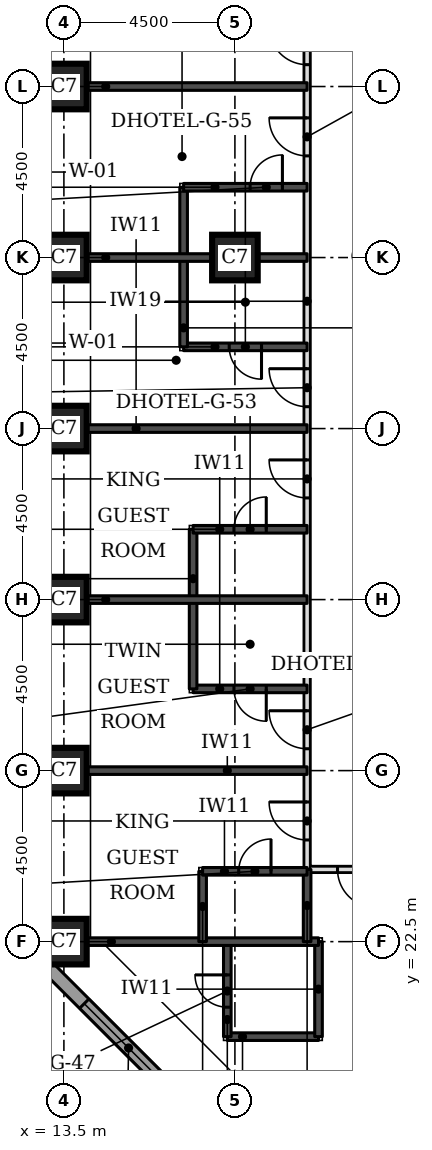
"""IFC4 building model, lengths in metres.
Left out: names, types, materials, properties, quantities, classifications, styles, units other than length and angle.
Written with IfcOpenShell. Run it as: python <this file> out.ifc"""

import sys

from ifc_helpers import new_model, si_unit, direction, frame, frame_2d, origin, origin_2d, place, context, subcontext, project, spatial, rectangle, extrude, element, fill, save


model = new_model("IFC4")
c1 = context("Model", 3, precision=1e-05, world=origin(), true_north=direction((0.0, 1.0)))
c2 = subcontext(c1, "Body", "Model", "MODEL_VIEW")
j1 = project(units=[si_unit("LENGTHUNIT", "METRE"), si_unit("PLANEANGLEUNIT", "RADIAN")], contexts=[c1])
p1 = place(None, origin())
s1 = spatial("IfcSite", under=j1, at=p1, CompositionType="ELEMENT")
p2 = place(p1, origin())
s2 = spatial("IfcBuilding", under=s1, at=p2, CompositionType="ELEMENT")
p3 = place(p2, frame((0.0, 0.0, 66.0)))
s3 = spatial("IfcBuildingStorey", under=s2, at=p3, CompositionType="ELEMENT", Elevation=66.0)
for number, where, z_axis, x_axis in (
    (1, (13.5, 22.5, 0.0), (0.0, 0.0, 1.0), (1.0, 0.0, 0.0)),
    (2, (13.5, 27.0, 0.0), (0.0, 0.0, 1.0), (1.0, 0.0, 0.0)),
    (3, (13.5, 31.5, 0.0), (0.0, 0.0, 1.0), (1.0, 0.0, 0.0)),
    (4, (13.5, 36.0, 0.0), (0.0, 0.0, 1.0), (1.0, 0.0, 0.0)),
    (5, (13.5, 40.5, 0.0), (0.0, 0.0, 1.0), (1.0, 0.0, 0.0)),
    (6, (18.0, 40.5, 0.0), (0.0, 0.0, 1.0), (1.0, 0.0, 0.0)),
    (7, (13.5, 45.0, 0.0), (0.0, 0.0, 1.0), (1.0, 0.0, 0.0)),
):
    element("IfcColumn", number, at=place(p3, frame(where, z_axis=z_axis, x_axis=x_axis)), inside=s3, PredefinedType="COLUMN", context=c2, shape_type="SweptSolid", body=[
        extrude(rectangle(XDim=1.2, YDim=1.2, at=origin_2d()), origin(), (0.0, 0.0, 1.0), 3.3),
    ])
p4 = place(p3, frame((12.674, 22.23, 0.0), z_axis=(0.0, 0.0, 1.0), x_axis=(0.707106781187, -0.707106781187, 0.0)))
e8 = element("IfcWall", 8, at=p4, inside=s3, PredefinedType="STANDARD", context=c2, shape_type="SweptSolid", body=[
    extrude(rectangle(XDim=7.151, YDim=0.35, at=frame_2d((3.576, 0.0))), origin(), (0.0, 0.0, 1.0), 3.055),
])
p5 = place(p4, frame((1.926, 0.0, 0.8)))
e9 = element("IfcOpeningElement", 9, at=p5, cuts=e8, PredefinedType="OPENING", context=c2, shape_type="SweptSolid", body=[
    extrude(rectangle(XDim=3.3, YDim=1.5, at=frame_2d((1.65, 0.75))), frame((0.0, 0.185, 0.0), z_axis=(0.0, -1.0, 0.0), x_axis=(1.0, 0.0, 0.0)), (0.0, 0.0, 1.0), 0.37),
])
p6 = place(p3, frame((19.9, 24.4, 0.0), z_axis=(0.0, 0.0, 1.0), x_axis=(1.0, 0.0, 0.0)))
e10 = element("IfcWall", 10, at=p6, inside=s3, PredefinedType="PARTITIONING", context=c2, shape_type="SweptSolid", body=[
    extrude(rectangle(XDim=32.2, YDim=0.15, at=frame_2d((16.1, 0.0))), origin(), (0.0, 0.0, 1.0), 3.08),
])
p7 = place(p6, frame((4.4, 0.0, 0.0)))
e11 = element("IfcOpeningElement", 11, at=p7, cuts=e10, PredefinedType="OPENING", context=c2, shape_type="SweptSolid", body=[
    extrude(rectangle(XDim=0.9, YDim=2.1, at=frame_2d((0.45, 1.05))), frame((0.0, 0.085, 0.0), z_axis=(0.0, -1.0, 0.0), x_axis=(1.0, 0.0, 0.0)), (0.0, 0.0, 1.0), 0.17),
])
p8 = place(p6, frame((8.9, 0.0, 0.0)))
e12 = element("IfcOpeningElement", 12, at=p8, cuts=e10, PredefinedType="OPENING", context=c2, shape_type="SweptSolid", body=[
    extrude(rectangle(XDim=0.9, YDim=2.1, at=frame_2d((0.45, 1.05))), frame((0.0, 0.085, 0.0), z_axis=(0.0, -1.0, 0.0), x_axis=(1.0, 0.0, 0.0)), (0.0, 0.0, 1.0), 0.17),
])
p9 = place(p6, frame((13.4, 0.0, 0.0)))
e13 = element("IfcOpeningElement", 13, at=p9, cuts=e10, PredefinedType="OPENING", context=c2, shape_type="SweptSolid", body=[
    extrude(rectangle(XDim=0.9, YDim=2.1, at=frame_2d((0.45, 1.05))), frame((0.0, 0.085, 0.0), z_axis=(0.0, -1.0, 0.0), x_axis=(1.0, 0.0, 0.0)), (0.0, 0.0, 1.0), 0.17),
])
p10 = place(p6, frame((17.9, 0.0, 0.0)))
e14 = element("IfcOpeningElement", 14, at=p10, cuts=e10, PredefinedType="OPENING", context=c2, shape_type="SweptSolid", body=[
    extrude(rectangle(XDim=0.9, YDim=2.1, at=frame_2d((0.45, 1.05))), frame((0.0, 0.085, 0.0), z_axis=(0.0, -1.0, 0.0), x_axis=(1.0, 0.0, 0.0)), (0.0, 0.0, 1.0), 0.17),
])
p11 = place(p6, frame((22.4, 0.0, 0.0)))
e15 = element("IfcOpeningElement", 15, at=p11, cuts=e10, PredefinedType="OPENING", context=c2, shape_type="SweptSolid", body=[
    extrude(rectangle(XDim=0.9, YDim=2.1, at=frame_2d((0.45, 1.05))), frame((0.0, 0.085, 0.0), z_axis=(0.0, -1.0, 0.0), x_axis=(1.0, 0.0, 0.0)), (0.0, 0.0, 1.0), 0.17),
])
p12 = place(p6, frame((26.9, 0.0, 0.0)))
e16 = element("IfcOpeningElement", 16, at=p12, cuts=e10, PredefinedType="OPENING", context=c2, shape_type="SweptSolid", body=[
    extrude(rectangle(XDim=0.9, YDim=2.1, at=frame_2d((0.45, 1.05))), frame((0.0, 0.085, 0.0), z_axis=(0.0, -1.0, 0.0), x_axis=(1.0, 0.0, 0.0)), (0.0, 0.0, 1.0), 0.17),
])
p13 = place(p6, frame((0.8, 0.0, 0.0)))
e17 = element("IfcOpeningElement", 17, at=p13, cuts=e10, PredefinedType="OPENING", context=c2, shape_type="SweptSolid", body=[
    extrude(rectangle(XDim=1.0, YDim=2.1, at=frame_2d((0.5, 1.05))), frame((0.0, 0.085, 0.0), z_axis=(0.0, -1.0, 0.0), x_axis=(1.0, 0.0, 0.0)), (0.0, 0.0, 1.0), 0.17),
])
p14 = place(p6, frame((30.4, 0.0, 0.0)))
e18 = element("IfcOpeningElement", 18, at=p14, cuts=e10, PredefinedType="OPENING", context=c2, shape_type="SweptSolid", body=[
    extrude(rectangle(XDim=1.0, YDim=2.1, at=frame_2d((0.5, 1.05))), frame((0.0, 0.085, 0.0), z_axis=(0.0, -1.0, 0.0), x_axis=(1.0, 0.0, 0.0)), (0.0, 0.0, 1.0), 0.17),
])
p15 = place(p3, frame((19.9, 24.4, 0.0), z_axis=(0.0, 0.0, 1.0), x_axis=(0.0, 1.0, 0.0)))
e19 = element("IfcWall", 19, at=p15, inside=s3, PredefinedType="PARTITIONING", context=c2, shape_type="SweptSolid", body=[
    extrude(rectangle(XDim=25.1, YDim=0.15, at=frame_2d((12.55, 0.0))), origin(), (0.0, 0.0, 1.0), 3.08),
])
p16 = place(p15, frame((0.775, 0.0, 0.0)))
e20 = element("IfcOpeningElement", 20, at=p16, cuts=e19, PredefinedType="OPENING", context=c2, shape_type="SweptSolid", body=[
    extrude(rectangle(XDim=1.0, YDim=2.1, at=frame_2d((0.5, 1.05))), frame((0.0, 0.085, 0.0), z_axis=(0.0, -1.0, 0.0), x_axis=(1.0, 0.0, 0.0)), (0.0, 0.0, 1.0), 0.17),
])
p17 = place(p15, frame((3.175, 0.0, 0.0)))
e21 = element("IfcOpeningElement", 21, at=p17, cuts=e19, PredefinedType="OPENING", context=c2, shape_type="SweptSolid", body=[
    extrude(rectangle(XDim=1.0, YDim=2.1, at=frame_2d((0.5, 1.05))), frame((0.0, 0.085, 0.0), z_axis=(0.0, -1.0, 0.0), x_axis=(1.0, 0.0, 0.0)), (0.0, 0.0, 1.0), 0.17),
])
p18 = place(p15, frame((9.775, 0.0, 0.0)))
e22 = element("IfcOpeningElement", 22, at=p18, cuts=e19, PredefinedType="OPENING", context=c2, shape_type="SweptSolid", body=[
    extrude(rectangle(XDim=1.0, YDim=2.1, at=frame_2d((0.5, 1.05))), frame((0.0, 0.085, 0.0), z_axis=(0.0, -1.0, 0.0), x_axis=(1.0, 0.0, 0.0)), (0.0, 0.0, 1.0), 0.17),
])
p19 = place(p15, frame((12.175, 0.0, 0.0)))
e23 = element("IfcOpeningElement", 23, at=p19, cuts=e19, PredefinedType="OPENING", context=c2, shape_type="SweptSolid", body=[
    extrude(rectangle(XDim=1.0, YDim=2.1, at=frame_2d((0.5, 1.05))), frame((0.0, 0.085, 0.0), z_axis=(0.0, -1.0, 0.0), x_axis=(1.0, 0.0, 0.0)), (0.0, 0.0, 1.0), 0.17),
])
p20 = place(p15, frame((18.775, 0.0, 0.0)))
e24 = element("IfcOpeningElement", 24, at=p20, cuts=e19, PredefinedType="OPENING", context=c2, shape_type="SweptSolid", body=[
    extrude(rectangle(XDim=1.0, YDim=2.1, at=frame_2d((0.5, 1.05))), frame((0.0, 0.085, 0.0), z_axis=(0.0, -1.0, 0.0), x_axis=(1.0, 0.0, 0.0)), (0.0, 0.0, 1.0), 0.17),
])
p21 = place(p15, frame((21.175, 0.0, 0.0)))
e25 = element("IfcOpeningElement", 25, at=p21, cuts=e19, PredefinedType="OPENING", context=c2, shape_type="SweptSolid", body=[
    extrude(rectangle(XDim=1.0, YDim=2.1, at=frame_2d((0.5, 1.05))), frame((0.0, 0.085, 0.0), z_axis=(0.0, -1.0, 0.0), x_axis=(1.0, 0.0, 0.0)), (0.0, 0.0, 1.0), 0.17),
])
p22 = place(p3, frame((17.8, 20.0, 0.0), z_axis=(0.0, 0.0, 1.0), x_axis=(1.0, 0.0, 0.0)))
e26 = element("IfcWall", 26, at=p22, inside=s3, PredefinedType="SOLIDWALL", context=c2, shape_type="SweptSolid", body=[
    extrude(rectangle(XDim=2.4, YDim=0.2, at=frame_2d((1.2, 0.0))), origin(), (0.0, 0.0, 1.0), 3.08),
])
p23 = place(p3, frame((17.8, 20.0, 0.0), z_axis=(0.0, 0.0, 1.0), x_axis=(0.0, 1.0, 0.0)))
e27 = element("IfcWall", 27, at=p23, inside=s3, PredefinedType="SOLIDWALL", context=c2, shape_type="SweptSolid", body=[
    extrude(rectangle(XDim=2.5, YDim=0.2, at=frame_2d((1.25, 0.0))), origin(), (0.0, 0.0, 1.0), 3.08),
])
p24 = place(p23, frame((0.775, 0.0, 0.0)))
e28 = element("IfcOpeningElement", 28, at=p24, cuts=e27, PredefinedType="OPENING", context=c2, shape_type="SweptSolid", body=[
    extrude(rectangle(XDim=0.85, YDim=2.1, at=frame_2d((0.425, 1.05))), frame((0.0, 0.11, 0.0), z_axis=(0.0, -1.0, 0.0), x_axis=(1.0, 0.0, 0.0)), (0.0, 0.0, 1.0), 0.22),
])
p25 = place(p3, frame((20.2, 20.0, 0.0), z_axis=(0.0, 0.0, 1.0), x_axis=(0.0, 1.0, 0.0)))
e29 = element("IfcWall", 29, at=p25, inside=s3, PredefinedType="SOLIDWALL", context=c2, shape_type="SweptSolid", body=[
    extrude(rectangle(XDim=2.5, YDim=0.2, at=frame_2d((1.25, 0.0))), origin(), (0.0, 0.0, 1.0), 3.08),
])
p26 = place(p3, frame((14.1, 22.5, 0.0), z_axis=(0.0, 0.0, 1.0), x_axis=(1.0, 0.0, 0.0)))
e30 = element("IfcWall", 30, at=p26, inside=s3, PredefinedType="SOLIDWALL", context=c2, shape_type="SweptSolid", body=[
    extrude(rectangle(XDim=6.1, YDim=0.2, at=frame_2d((3.05, 0.0))), origin(), (0.0, 0.0, 1.0), 3.08),
])
p27 = place(p3, frame((17.15, 22.5, 0.0), z_axis=(0.0, 0.0, 1.0), x_axis=(0.0, 1.0, 0.0)))
e31 = element("IfcWall", 31, at=p27, inside=s3, PredefinedType="SOLIDWALL", context=c2, shape_type="SweptSolid", body=[
    extrude(rectangle(XDim=1.85, YDim=0.2, at=frame_2d((0.925, 0.0))), origin(), (0.0, 0.0, 1.0), 3.08),
])
p28 = place(p3, frame((19.9, 22.5, 0.0), z_axis=(0.0, 0.0, 1.0), x_axis=(0.0, 1.0, 0.0)))
e32 = element("IfcWall", 32, at=p28, inside=s3, PredefinedType="SOLIDWALL", context=c2, shape_type="SweptSolid", body=[
    extrude(rectangle(XDim=1.9, YDim=0.2, at=frame_2d((0.95, 0.0))), origin(), (0.0, 0.0, 1.0), 3.08),
])
p29 = place(p3, frame((17.15, 24.35, 0.0), z_axis=(0.0, 0.0, 1.0), x_axis=(1.0, 0.0, 0.0)))
e33 = element("IfcWall", 33, at=p29, inside=s3, PredefinedType="SOLIDWALL", context=c2, shape_type="SweptSolid", body=[
    extrude(rectangle(XDim=2.75, YDim=0.2, at=frame_2d((1.375, 0.0))), origin(), (0.0, 0.0, 1.0), 3.08),
])
p30 = place(p29, frame((0.95, 0.0, 0.0)))
e34 = element("IfcOpeningElement", 34, at=p30, cuts=e33, PredefinedType="OPENING", context=c2, shape_type="SweptSolid", body=[
    extrude(rectangle(XDim=0.85, YDim=2.1, at=frame_2d((0.425, 1.05))), frame((0.0, 0.11, 0.0), z_axis=(0.0, -1.0, 0.0), x_axis=(1.0, 0.0, 0.0)), (0.0, 0.0, 1.0), 0.22),
])
p31 = place(p3, frame((14.1, 27.0, 0.0), z_axis=(0.0, 0.0, 1.0), x_axis=(1.0, 0.0, 0.0)))
e35 = element("IfcWall", 35, at=p31, inside=s3, PredefinedType="SOLIDWALL", context=c2, shape_type="SweptSolid", body=[
    extrude(rectangle(XDim=5.8, YDim=0.2, at=frame_2d((2.9, 0.0))), origin(), (0.0, 0.0, 1.0), 3.08),
])
p32 = place(p3, frame((16.9, 29.15, 0.0), z_axis=(0.0, 0.0, 1.0), x_axis=(1.0, 0.0, 0.0)))
e36 = element("IfcWall", 36, at=p32, inside=s3, PredefinedType="SOLIDWALL", context=c2, shape_type="SweptSolid", body=[
    extrude(rectangle(XDim=3.0, YDim=0.2, at=frame_2d((1.5, 0.0))), origin(), (0.0, 0.0, 1.0), 3.08),
])
p33 = place(p32, frame((1.075, 0.0, 0.0)))
e37 = element("IfcOpeningElement", 37, at=p33, cuts=e36, PredefinedType="OPENING", context=c2, shape_type="SweptSolid", body=[
    extrude(rectangle(XDim=0.85, YDim=2.1, at=frame_2d((0.425, 1.05))), frame((0.0, 0.11, 0.0), z_axis=(0.0, -1.0, 0.0), x_axis=(1.0, 0.0, 0.0)), (0.0, 0.0, 1.0), 0.22),
])
p34 = place(p3, frame((16.9, 29.15, 0.0), z_axis=(0.0, 0.0, 1.0), x_axis=(0.0, 1.0, 0.0)))
e38 = element("IfcWall", 38, at=p34, inside=s3, PredefinedType="SOLIDWALL", context=c2, shape_type="SweptSolid", body=[
    extrude(rectangle(XDim=4.2, YDim=0.2, at=frame_2d((2.1, 0.0))), origin(), (0.0, 0.0, 1.0), 3.08),
])
p35 = place(p3, frame((14.1, 31.5, 0.0), z_axis=(0.0, 0.0, 1.0), x_axis=(1.0, 0.0, 0.0)))
e39 = element("IfcWall", 39, at=p35, inside=s3, PredefinedType="SOLIDWALL", context=c2, shape_type="SweptSolid", body=[
    extrude(rectangle(XDim=5.8, YDim=0.2, at=frame_2d((2.9, 0.0))), origin(), (0.0, 0.0, 1.0), 3.08),
])
p36 = place(p3, frame((16.9, 33.35, 0.0), z_axis=(0.0, 0.0, 1.0), x_axis=(1.0, 0.0, 0.0)))
e40 = element("IfcWall", 40, at=p36, inside=s3, PredefinedType="SOLIDWALL", context=c2, shape_type="SweptSolid", body=[
    extrude(rectangle(XDim=3.0, YDim=0.2, at=frame_2d((1.5, 0.0))), origin(), (0.0, 0.0, 1.0), 3.08),
])
p37 = place(p36, frame((1.075, 0.0, 0.0)))
e41 = element("IfcOpeningElement", 41, at=p37, cuts=e40, PredefinedType="OPENING", context=c2, shape_type="SweptSolid", body=[
    extrude(rectangle(XDim=0.85, YDim=2.1, at=frame_2d((0.425, 1.05))), frame((0.0, 0.11, 0.0), z_axis=(0.0, -1.0, 0.0), x_axis=(1.0, 0.0, 0.0)), (0.0, 0.0, 1.0), 0.22),
])
p38 = place(p3, frame((14.1, 36.0, 0.0), z_axis=(0.0, 0.0, 1.0), x_axis=(1.0, 0.0, 0.0)))
e42 = element("IfcWall", 42, at=p38, inside=s3, PredefinedType="SOLIDWALL", context=c2, shape_type="SweptSolid", body=[
    extrude(rectangle(XDim=5.8, YDim=0.2, at=frame_2d((2.9, 0.0))), origin(), (0.0, 0.0, 1.0), 3.08),
])
p39 = place(p3, frame((16.65, 38.15, 0.0), z_axis=(0.0, 0.0, 1.0), x_axis=(1.0, 0.0, 0.0)))
e43 = element("IfcWall", 43, at=p39, inside=s3, PredefinedType="SOLIDWALL", context=c2, shape_type="SweptSolid", body=[
    extrude(rectangle(XDim=3.25, YDim=0.2, at=frame_2d((1.625, 0.0))), origin(), (0.0, 0.0, 1.0), 3.08),
])
p40 = place(p39, frame((1.2, 0.0, 0.0)))
e44 = element("IfcOpeningElement", 44, at=p40, cuts=e43, PredefinedType="OPENING", context=c2, shape_type="SweptSolid", body=[
    extrude(rectangle(XDim=0.85, YDim=2.1, at=frame_2d((0.425, 1.05))), frame((0.0, 0.11, 0.0), z_axis=(0.0, -1.0, 0.0), x_axis=(1.0, 0.0, 0.0)), (0.0, 0.0, 1.0), 0.22),
])
p41 = place(p3, frame((16.65, 38.15, 0.0), z_axis=(0.0, 0.0, 1.0), x_axis=(0.0, 1.0, 0.0)))
e45 = element("IfcWall", 45, at=p41, inside=s3, PredefinedType="SOLIDWALL", context=c2, shape_type="SweptSolid", body=[
    extrude(rectangle(XDim=4.2, YDim=0.2, at=frame_2d((2.1, 0.0))), origin(), (0.0, 0.0, 1.0), 3.08),
])
p42 = place(p3, frame((14.1, 40.5, 0.0), z_axis=(0.0, 0.0, 1.0), x_axis=(1.0, 0.0, 0.0)))
e46 = element("IfcWall", 46, at=p42, inside=s3, PredefinedType="SOLIDWALL", context=c2, shape_type="SweptSolid", body=[
    extrude(rectangle(XDim=5.8, YDim=0.2, at=frame_2d((2.9, 0.0))), origin(), (0.0, 0.0, 1.0), 3.08),
])
p43 = place(p3, frame((16.65, 42.35, 0.0), z_axis=(0.0, 0.0, 1.0), x_axis=(1.0, 0.0, 0.0)))
e47 = element("IfcWall", 47, at=p43, inside=s3, PredefinedType="SOLIDWALL", context=c2, shape_type="SweptSolid", body=[
    extrude(rectangle(XDim=3.25, YDim=0.2, at=frame_2d((1.625, 0.0))), origin(), (0.0, 0.0, 1.0), 3.08),
])
p44 = place(p43, frame((1.75, 0.0, 0.0)))
e48 = element("IfcOpeningElement", 48, at=p44, cuts=e47, PredefinedType="OPENING", context=c2, shape_type="SweptSolid", body=[
    extrude(rectangle(XDim=0.85, YDim=2.1, at=frame_2d((0.425, 1.05))), frame((0.0, 0.11, 0.0), z_axis=(0.0, -1.0, 0.0), x_axis=(1.0, 0.0, 0.0)), (0.0, 0.0, 1.0), 0.22),
])
p45 = place(p3, frame((14.1, 45.0, 0.0), z_axis=(0.0, 0.0, 1.0), x_axis=(1.0, 0.0, 0.0)))
e49 = element("IfcWall", 49, at=p45, inside=s3, PredefinedType="SOLIDWALL", context=c2, shape_type="SweptSolid", body=[
    extrude(rectangle(XDim=5.8, YDim=0.2, at=frame_2d((2.9, 0.0))), origin(), (0.0, 0.0, 1.0), 3.08),
])
p46 = place(p5, origin())
e50 = element("IfcWindow", 50, at=p46, inside=s3, PartitioningType="SINGLE_PANEL", PredefinedType="WINDOW", context=c2, shape_type="SweptSolid", body=[
    extrude(rectangle(XDim=3.3, YDim=1.5, at=frame_2d((1.65, 0.75))), frame((0.0, 0.085, 0.0), z_axis=(0.0, -1.0, 0.0), x_axis=(1.0, 0.0, 0.0)), (0.0, 0.0, 1.0), 0.06),
])
fill(e9, e50)
p47 = place(p16, origin())
e51 = element("IfcDoor", 51, at=p47, inside=s3, OperationType="SINGLE_SWING_RIGHT", PredefinedType="DOOR", context=c2, shape_type="SweptSolid", body=[
    extrude(rectangle(XDim=1.0, YDim=2.1, at=frame_2d((0.5, 1.05))), frame((0.0, 0.025, 0.0), z_axis=(0.0, -1.0, 0.0), x_axis=(1.0, 0.0, 0.0)), (0.0, 0.0, 1.0), 0.05),
])
fill(e20, e51)
p48 = place(p30, origin())
e52 = element("IfcDoor", 52, at=p48, inside=s3, OperationType="SINGLE_SWING_RIGHT", PredefinedType="DOOR", context=c2, shape_type="SweptSolid", body=[
    extrude(rectangle(XDim=0.85, YDim=2.1, at=frame_2d((0.425, 1.05))), frame((0.0, 0.025, 0.0), z_axis=(0.0, -1.0, 0.0), x_axis=(1.0, 0.0, 0.0)), (0.0, 0.0, 1.0), 0.05),
])
fill(e34, e52)
p49 = place(p17, origin())
e53 = element("IfcDoor", 53, at=p49, inside=s3, OperationType="SINGLE_SWING_RIGHT", PredefinedType="DOOR", context=c2, shape_type="SweptSolid", body=[
    extrude(rectangle(XDim=1.0, YDim=2.1, at=frame_2d((0.5, 1.05))), frame((0.0, 0.025, 0.0), z_axis=(0.0, -1.0, 0.0), x_axis=(1.0, 0.0, 0.0)), (0.0, 0.0, 1.0), 0.05),
])
fill(e21, e53)
p50 = place(p33, frame((0.85, 0.0, 0.0), z_axis=(0.0, 0.0, 1.0), x_axis=(-1.0, 0.0, 0.0)))
e54 = element("IfcDoor", 54, at=p50, inside=s3, OperationType="SINGLE_SWING_LEFT", PredefinedType="DOOR", context=c2, shape_type="SweptSolid", body=[
    extrude(rectangle(XDim=0.85, YDim=2.1, at=frame_2d((0.425, 1.05))), frame((0.0, 0.025, 0.0), z_axis=(0.0, -1.0, 0.0), x_axis=(1.0, 0.0, 0.0)), (0.0, 0.0, 1.0), 0.05),
])
fill(e37, e54)
p51 = place(p18, origin())
e55 = element("IfcDoor", 55, at=p51, inside=s3, OperationType="SINGLE_SWING_RIGHT", PredefinedType="DOOR", context=c2, shape_type="SweptSolid", body=[
    extrude(rectangle(XDim=1.0, YDim=2.1, at=frame_2d((0.5, 1.05))), frame((0.0, 0.025, 0.0), z_axis=(0.0, -1.0, 0.0), x_axis=(1.0, 0.0, 0.0)), (0.0, 0.0, 1.0), 0.05),
])
fill(e22, e55)
p52 = place(p37, origin())
e56 = element("IfcDoor", 56, at=p52, inside=s3, OperationType="SINGLE_SWING_RIGHT", PredefinedType="DOOR", context=c2, shape_type="SweptSolid", body=[
    extrude(rectangle(XDim=0.85, YDim=2.1, at=frame_2d((0.425, 1.05))), frame((0.0, 0.025, 0.0), z_axis=(0.0, -1.0, 0.0), x_axis=(1.0, 0.0, 0.0)), (0.0, 0.0, 1.0), 0.05),
])
fill(e41, e56)
p53 = place(p19, origin())
e57 = element("IfcDoor", 57, at=p53, inside=s3, OperationType="SINGLE_SWING_RIGHT", PredefinedType="DOOR", context=c2, shape_type="SweptSolid", body=[
    extrude(rectangle(XDim=1.0, YDim=2.1, at=frame_2d((0.5, 1.05))), frame((0.0, 0.025, 0.0), z_axis=(0.0, -1.0, 0.0), x_axis=(1.0, 0.0, 0.0)), (0.0, 0.0, 1.0), 0.05),
])
fill(e23, e57)
p54 = place(p40, frame((0.85, 0.0, 0.0), z_axis=(0.0, 0.0, 1.0), x_axis=(-1.0, 0.0, 0.0)))
e58 = element("IfcDoor", 58, at=p54, inside=s3, OperationType="SINGLE_SWING_LEFT", PredefinedType="DOOR", context=c2, shape_type="SweptSolid", body=[
    extrude(rectangle(XDim=0.85, YDim=2.1, at=frame_2d((0.425, 1.05))), frame((0.0, 0.025, 0.0), z_axis=(0.0, -1.0, 0.0), x_axis=(1.0, 0.0, 0.0)), (0.0, 0.0, 1.0), 0.05),
])
fill(e44, e58)
p55 = place(p20, origin())
e59 = element("IfcDoor", 59, at=p55, inside=s3, OperationType="SINGLE_SWING_RIGHT", PredefinedType="DOOR", context=c2, shape_type="SweptSolid", body=[
    extrude(rectangle(XDim=1.0, YDim=2.1, at=frame_2d((0.5, 1.05))), frame((0.0, 0.025, 0.0), z_axis=(0.0, -1.0, 0.0), x_axis=(1.0, 0.0, 0.0)), (0.0, 0.0, 1.0), 0.05),
])
fill(e24, e59)
p56 = place(p44, origin())
e60 = element("IfcDoor", 60, at=p56, inside=s3, OperationType="SINGLE_SWING_RIGHT", PredefinedType="DOOR", context=c2, shape_type="SweptSolid", body=[
    extrude(rectangle(XDim=0.85, YDim=2.1, at=frame_2d((0.425, 1.05))), frame((0.0, 0.025, 0.0), z_axis=(0.0, -1.0, 0.0), x_axis=(1.0, 0.0, 0.0)), (0.0, 0.0, 1.0), 0.05),
])
fill(e48, e60)
p57 = place(p21, origin())
e61 = element("IfcDoor", 61, at=p57, inside=s3, OperationType="SINGLE_SWING_RIGHT", PredefinedType="DOOR", context=c2, shape_type="SweptSolid", body=[
    extrude(rectangle(XDim=1.0, YDim=2.1, at=frame_2d((0.5, 1.05))), frame((0.0, 0.025, 0.0), z_axis=(0.0, -1.0, 0.0), x_axis=(1.0, 0.0, 0.0)), (0.0, 0.0, 1.0), 0.05),
])
fill(e25, e61)
p58 = place(p13, frame((1.0, 0.0, 0.0), z_axis=(0.0, 0.0, 1.0), x_axis=(-1.0, 0.0, 0.0)))
e62 = element("IfcDoor", 62, at=p58, inside=s3, OperationType="SINGLE_SWING_LEFT", PredefinedType="DOOR", context=c2, shape_type="SweptSolid", body=[
    extrude(rectangle(XDim=1.0, YDim=2.1, at=frame_2d((0.5, 1.05))), frame((0.0, 0.025, 0.0), z_axis=(0.0, -1.0, 0.0), x_axis=(1.0, 0.0, 0.0)), (0.0, 0.0, 1.0), 0.05),
])
fill(e17, e62)
p59 = place(p24, origin())
e63 = element("IfcDoor", 63, at=p59, inside=s3, OperationType="SINGLE_SWING_RIGHT", PredefinedType="DOOR", context=c2, shape_type="SweptSolid", body=[
    extrude(rectangle(XDim=0.85, YDim=2.1, at=frame_2d((0.425, 1.05))), frame((0.0, 0.025, 0.0), z_axis=(0.0, -1.0, 0.0), x_axis=(1.0, 0.0, 0.0)), (0.0, 0.0, 1.0), 0.05),
])
fill(e28, e63)
save(model, sys.argv[1])
